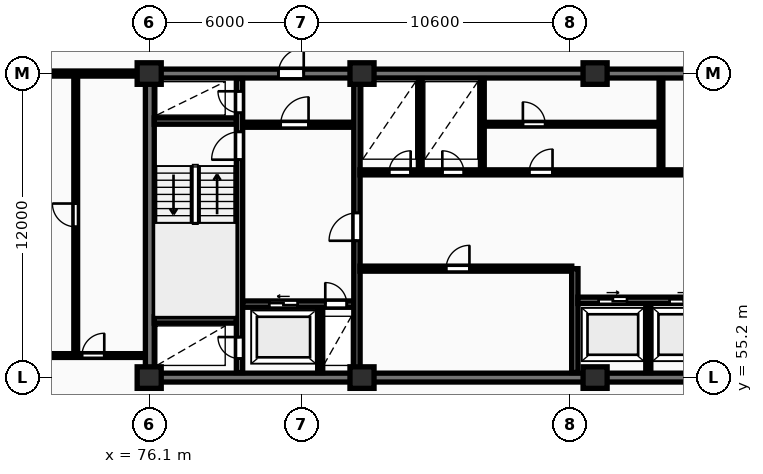
"""IFC4 building model, lengths in metres.
Left out: names, types, materials, properties, quantities, classifications, styles, units other than length and angle.
Written with IfcOpenShell. Run it as: python <this file> out.ifc"""

import sys

from ifc_helpers import new_model, si_unit, direction, frame, frame_2d, origin, origin_2d, place, context, subcontext, project, spatial, rectangle, extrude, element, fill, save


model = new_model("IFC4")
c1 = context("Model", 3, precision=1e-05, world=origin(), true_north=direction((0.0, 1.0)))
c2 = subcontext(c1, "Body", "Model", "MODEL_VIEW")
j1 = project(units=[si_unit("LENGTHUNIT", "METRE"), si_unit("PLANEANGLEUNIT", "RADIAN")], contexts=[c1])
p1 = place(None, origin())
s1 = spatial("IfcSite", under=j1, at=p1, CompositionType="ELEMENT")
p2 = place(p1, origin())
s2 = spatial("IfcBuilding", under=s1, at=p2, CompositionType="ELEMENT")
p3 = place(p2, frame((0.0, 0.0, 132.8)))
s3 = spatial("IfcBuildingStorey", under=s2, at=p3, CompositionType="ELEMENT", Elevation=132.8)
for number, where, z_axis, x_axis in (
    (1, (76.1, 55.2, 0.0), (0.0, 0.0, 1.0), (1.0, 0.0, 0.0)),
    (2, (76.1, 67.2, 0.0), (0.0, 0.0, 1.0), (1.0, 0.0, 0.0)),
    (3, (84.5, 55.2, 0.0), (0.0, 0.0, 1.0), (1.0, 0.0, 0.0)),
    (4, (84.5, 67.2, 0.0), (0.0, 0.0, 1.0), (1.0, 0.0, 0.0)),
    (5, (93.7, 55.2, 0.0), (0.0, 0.0, 1.0), (1.0, 0.0, 0.0)),
    (6, (93.7, 67.2, 0.0), (0.0, 0.0, 1.0), (1.0, 0.0, 0.0)),
):
    element("IfcColumn", number, at=place(p3, frame(where, z_axis=z_axis, x_axis=x_axis)), inside=s3, PredefinedType="COLUMN", context=c2, shape_type="SweptSolid", body=[
        extrude(rectangle(XDim=0.95, YDim=0.85, at=origin_2d()), origin(), (0.0, 0.0, 1.0), 3.25),
    ])
p4 = place(p3, frame((75.95, 55.2, 0.0), z_axis=(0.0, 0.0, 1.0), x_axis=(1.0, 0.0, 0.0)))
e7 = element("IfcWall", 7, at=p4, inside=s3, PredefinedType="SHEAR", context=c2, shape_type="SweptSolid", body=[
    extrude(rectangle(XDim=36.3, YDim=0.35, at=frame_2d((18.15, 0.0))), origin(), (0.0, 0.0, 1.0), 3.25),
])
p5 = place(p3, frame((76.125, 55.375, 0.0), z_axis=(0.0, 0.0, 1.0), x_axis=(0.0, 1.0, 0.0)))
e8 = element("IfcWall", 8, at=p5, inside=s3, PredefinedType="SHEAR", context=c2, shape_type="SweptSolid", body=[
    extrude(rectangle(XDim=11.65, YDim=0.35, at=frame_2d((5.825, 0.0))), origin(), (0.0, 0.0, 1.0), 3.25),
])
p6 = place(p3, frame((75.95, 67.2, 0.0), z_axis=(0.0, 0.0, 1.0), x_axis=(1.0, 0.0, 0.0)))
e9 = element("IfcWall", 9, at=p6, inside=s3, PredefinedType="SHEAR", context=c2, shape_type="SweptSolid", body=[
    extrude(rectangle(XDim=36.3, YDim=0.35, at=frame_2d((18.15, 0.0))), origin(), (0.0, 0.0, 1.0), 3.25),
])
p7 = place(p6, frame((5.25, 0.0, 0.0)))
e10 = element("IfcOpeningElement", 10, at=p7, cuts=e9, PredefinedType="OPENING", context=c2, shape_type="SweptSolid", body=[
    extrude(rectangle(XDim=1.0, YDim=2.15, at=frame_2d((0.5, 1.075))), frame((0.0, 0.185, 0.0), z_axis=(0.0, -1.0, 0.0), x_axis=(1.0, 0.0, 0.0)), (0.0, 0.0, 1.0), 0.37),
])
p8 = place(p6, frame((21.6, 0.0, 0.0)))
e11 = element("IfcOpeningElement", 11, at=p8, cuts=e9, PredefinedType="OPENING", context=c2, shape_type="SweptSolid", body=[
    extrude(rectangle(XDim=1.5, YDim=2.2, at=frame_2d((0.75, 1.1))), frame((0.0, 0.185, 0.0), z_axis=(0.0, -1.0, 0.0), x_axis=(1.0, 0.0, 0.0)), (0.0, 0.0, 1.0), 0.37),
])
p9 = place(p6, frame((30.45, 0.0, 0.0)))
e12 = element("IfcOpeningElement", 12, at=p9, cuts=e9, PredefinedType="OPENING", context=c2, shape_type="SweptSolid", body=[
    extrude(rectangle(XDim=1.0, YDim=2.15, at=frame_2d((0.5, 1.075))), frame((0.0, 0.185, 0.0), z_axis=(0.0, -1.0, 0.0), x_axis=(1.0, 0.0, 0.0)), (0.0, 0.0, 1.0), 0.37),
])
p10 = place(p3, frame((79.665, 55.4, 0.0), z_axis=(0.0, 0.0, 1.0), x_axis=(0.0, 1.0, 0.0)))
e13 = element("IfcWall", 13, at=p10, inside=s3, PredefinedType="SHEAR", context=c2, shape_type="SweptSolid", body=[
    extrude(rectangle(XDim=11.6, YDim=0.25, at=frame_2d((5.8, 0.0))), origin(), (0.0, 0.0, 1.0), 3.25),
])
p11 = place(p10, frame((0.55, 0.0, 0.0)))
e14 = element("IfcOpeningElement", 14, at=p11, cuts=e13, PredefinedType="OPENING", context=c2, shape_type="SweptSolid", body=[
    extrude(rectangle(XDim=0.85, YDim=2.05, at=frame_2d((0.425, 1.025))), frame((0.0, 0.135, 0.0), z_axis=(0.0, -1.0, 0.0), x_axis=(1.0, 0.0, 0.0)), (0.0, 0.0, 1.0), 0.27),
])
p12 = place(p10, frame((8.4, 0.0, 0.0)))
e15 = element("IfcOpeningElement", 15, at=p12, cuts=e13, PredefinedType="OPENING", context=c2, shape_type="SweptSolid", body=[
    extrude(rectangle(XDim=1.1, YDim=2.1, at=frame_2d((0.55, 1.05))), frame((0.0, 0.135, 0.0), z_axis=(0.0, -1.0, 0.0), x_axis=(1.0, 0.0, 0.0)), (0.0, 0.0, 1.0), 0.27),
])
p13 = place(p10, frame((10.25, 0.0, 0.0)))
e16 = element("IfcOpeningElement", 16, at=p13, cuts=e13, PredefinedType="OPENING", context=c2, shape_type="SweptSolid", body=[
    extrude(rectangle(XDim=0.85, YDim=2.05, at=frame_2d((0.425, 1.025))), frame((0.0, 0.135, 0.0), z_axis=(0.0, -1.0, 0.0), x_axis=(1.0, 0.0, 0.0)), (0.0, 0.0, 1.0), 0.27),
])
for number, where, z_axis, x_axis in (
    (17, (76.3, 57.475, 0.0), (0.0, 0.0, 1.0), (1.0, 0.0, 0.0)),
    (18, (76.3, 65.325, 0.0), (0.0, 0.0, 1.0), (1.0, 0.0, 0.0)),
):
    element("IfcWall", number, at=place(p3, frame(where, z_axis=z_axis, x_axis=x_axis)), inside=s3, PredefinedType="SHEAR", context=c2, shape_type="SweptSolid", body=[
        extrude(rectangle(XDim=3.24, YDim=0.25, at=frame_2d((1.62, 0.0))), origin(), (0.0, 0.0, 1.0), 3.25),
    ])
p14 = place(p3, frame((79.79, 58.1, 0.0), z_axis=(0.0, 0.0, 1.0), x_axis=(1.0, 0.0, 0.0)))
e19 = element("IfcWall", 19, at=p14, inside=s3, PredefinedType="SHEAR", context=c2, shape_type="SweptSolid", body=[
    extrude(rectangle(XDim=4.39, YDim=0.25, at=frame_2d((2.195, 0.0))), origin(), (0.0, 0.0, 1.0), 3.25),
])
p15 = place(p14, frame((1.05, 0.0, 0.0)))
e20 = element("IfcOpeningElement", 20, at=p15, cuts=e19, PredefinedType="OPENING", context=c2, shape_type="SweptSolid", body=[
    extrude(rectangle(XDim=1.12, YDim=2.12, at=frame_2d((0.56, 1.06))), frame((0.0, 0.135, 0.0), z_axis=(0.0, -1.0, 0.0), x_axis=(1.0, 0.0, 0.0)), (0.0, 0.0, 1.0), 0.27),
])
p16 = place(p14, frame((3.26, 0.0, 0.0)))
e21 = element("IfcOpeningElement", 21, at=p16, cuts=e19, PredefinedType="OPENING", context=c2, shape_type="SweptSolid", body=[
    extrude(rectangle(XDim=0.85, YDim=2.05, at=frame_2d((0.425, 1.025))), frame((0.0, 0.135, 0.0), z_axis=(0.0, -1.0, 0.0), x_axis=(1.0, 0.0, 0.0)), (0.0, 0.0, 1.0), 0.27),
])
p17 = place(p3, frame((82.85, 55.4, 0.0), z_axis=(0.0, 0.0, 1.0), x_axis=(0.0, 1.0, 0.0)))
e22 = element("IfcWall", 22, at=p17, inside=s3, PredefinedType="PARTITIONING", context=c2, shape_type="SweptSolid", body=[
    extrude(rectangle(XDim=2.56, YDim=0.2, at=frame_2d((1.28, 0.0))), origin(), (0.0, 0.0, 1.0), 2.97),
])
p18 = place(p3, frame((79.79, 65.18, 0.0), z_axis=(0.0, 0.0, 1.0), x_axis=(1.0, 0.0, 0.0)))
e23 = element("IfcWall", 23, at=p18, inside=s3, PredefinedType="PARTITIONING", context=c2, shape_type="SweptSolid", body=[
    extrude(rectangle(XDim=4.39, YDim=0.2, at=frame_2d((2.195, 0.0))), origin(), (0.0, 0.0, 1.0), 2.97),
])
p19 = place(p18, frame((1.5, 0.0, 0.0)))
e24 = element("IfcOpeningElement", 24, at=p19, cuts=e23, PredefinedType="OPENING", context=c2, shape_type="SweptSolid", body=[
    extrude(rectangle(XDim=1.1, YDim=2.1, at=frame_2d((0.55, 1.05))), frame((0.0, 0.11, 0.0), z_axis=(0.0, -1.0, 0.0), x_axis=(1.0, 0.0, 0.0)), (0.0, 0.0, 1.0), 0.22),
])
p20 = place(p3, frame((84.3, 55.4, 0.0), z_axis=(0.0, 0.0, 1.0), x_axis=(0.0, 1.0, 0.0)))
e25 = element("IfcWall", 25, at=p20, inside=s3, PredefinedType="SHEAR", context=c2, shape_type="SweptSolid", body=[
    extrude(rectangle(XDim=11.6, YDim=0.25, at=frame_2d((5.8, 0.0))), origin(), (0.0, 0.0, 1.0), 3.25),
])
p21 = place(p20, frame((5.2, 0.0, 0.0)))
e26 = element("IfcOpeningElement", 26, at=p21, cuts=e25, PredefinedType="OPENING", context=c2, shape_type="SweptSolid", body=[
    extrude(rectangle(XDim=1.1, YDim=2.1, at=frame_2d((0.55, 1.05))), frame((0.0, 0.135, 0.0), z_axis=(0.0, -1.0, 0.0), x_axis=(1.0, 0.0, 0.0)), (0.0, 0.0, 1.0), 0.27),
])
p22 = place(p3, frame((84.42, 59.5, 0.0), z_axis=(0.0, 0.0, 1.0), x_axis=(1.0, 0.0, 0.0)))
e27 = element("IfcWall", 27, at=p22, inside=s3, PredefinedType="PARTITIONING", context=c2, shape_type="SweptSolid", body=[
    extrude(rectangle(XDim=8.36, YDim=0.2, at=frame_2d((4.18, 0.0))), origin(), (0.0, 0.0, 1.0), 2.97),
])
p23 = place(p22, frame((3.4, 0.0, 0.0)))
e28 = element("IfcOpeningElement", 28, at=p23, cuts=e27, PredefinedType="OPENING", context=c2, shape_type="SweptSolid", body=[
    extrude(rectangle(XDim=0.92, YDim=2.08, at=frame_2d((0.46, 1.04))), frame((0.0, 0.11, 0.0), z_axis=(0.0, -1.0, 0.0), x_axis=(1.0, 0.0, 0.0)), (0.0, 0.0, 1.0), 0.22),
])
p24 = place(p3, frame((92.9, 55.4, 0.0), z_axis=(0.0, 0.0, 1.0), x_axis=(0.0, 1.0, 0.0)))
e29 = element("IfcWall", 29, at=p24, inside=s3, PredefinedType="SHEAR", context=c2, shape_type="SweptSolid", body=[
    extrude(rectangle(XDim=4.1, YDim=0.25, at=frame_2d((2.05, 0.0))), origin(), (0.0, 0.0, 1.0), 3.25),
])
p25 = place(p3, frame((95.8, 55.4, 0.0), z_axis=(0.0, 0.0, 1.0), x_axis=(0.0, 1.0, 0.0)))
e30 = element("IfcWall", 30, at=p25, inside=s3, PredefinedType="PARTITIONING", context=c2, shape_type="SweptSolid", body=[
    extrude(rectangle(XDim=2.72, YDim=0.2, at=frame_2d((1.36, 0.0))), origin(), (0.0, 0.0, 1.0), 2.97),
])
p26 = place(p3, frame((93.02, 58.25, 0.0), z_axis=(0.0, 0.0, 1.0), x_axis=(1.0, 0.0, 0.0)))
e31 = element("IfcWall", 31, at=p26, inside=s3, PredefinedType="SHEAR", context=c2, shape_type="SweptSolid", body=[
    extrude(rectangle(XDim=8.36, YDim=0.25, at=frame_2d((4.18, 0.0))), origin(), (0.0, 0.0, 1.0), 3.25),
])
p27 = place(p26, frame((0.82, 0.0, 0.0)))
e32 = element("IfcOpeningElement", 32, at=p27, cuts=e31, PredefinedType="OPENING", context=c2, shape_type="SweptSolid", body=[
    extrude(rectangle(XDim=1.12, YDim=2.12, at=frame_2d((0.56, 1.06))), frame((0.0, 0.135, 0.0), z_axis=(0.0, -1.0, 0.0), x_axis=(1.0, 0.0, 0.0)), (0.0, 0.0, 1.0), 0.27),
])
p28 = place(p26, frame((3.62, 0.0, 0.0)))
e33 = element("IfcOpeningElement", 33, at=p28, cuts=e31, PredefinedType="OPENING", context=c2, shape_type="SweptSolid", body=[
    extrude(rectangle(XDim=1.12, YDim=2.12, at=frame_2d((0.56, 1.06))), frame((0.0, 0.135, 0.0), z_axis=(0.0, -1.0, 0.0), x_axis=(1.0, 0.0, 0.0)), (0.0, 0.0, 1.0), 0.27),
])
p29 = place(p26, frame((6.42, 0.0, 0.0)))
e34 = element("IfcOpeningElement", 34, at=p29, cuts=e31, PredefinedType="OPENING", context=c2, shape_type="SweptSolid", body=[
    extrude(rectangle(XDim=1.12, YDim=2.12, at=frame_2d((0.56, 1.06))), frame((0.0, 0.135, 0.0), z_axis=(0.0, -1.0, 0.0), x_axis=(1.0, 0.0, 0.0)), (0.0, 0.0, 1.0), 0.27),
])
for number, where, z_axis, x_axis in (
    (35, (86.8, 63.4, 0.0), (0.0, 0.0, 1.0), (0.0, 1.0, 0.0)),
    (36, (89.25, 63.4, 0.0), (0.0, 0.0, 1.0), (0.0, 1.0, 0.0)),
):
    element("IfcWall", number, at=place(p3, frame(where, z_axis=z_axis, x_axis=x_axis)), inside=s3, PredefinedType="PARTITIONING", context=c2, shape_type="SweptSolid", body=[
        extrude(rectangle(XDim=3.6, YDim=0.15, at=frame_2d((1.8, 0.0))), origin(), (0.0, 0.0, 1.0), 2.97),
    ])
p30 = place(p3, frame((89.25, 65.2, 0.0), z_axis=(0.0, 0.0, 1.0), x_axis=(1.0, 0.0, 0.0)))
e37 = element("IfcWall", 37, at=p30, inside=s3, PredefinedType="PARTITIONING", context=c2, shape_type="SweptSolid", body=[
    extrude(rectangle(XDim=7.05, YDim=0.15, at=frame_2d((3.525, 0.0))), origin(), (0.0, 0.0, 1.0), 2.97),
])
p31 = place(p30, frame((1.6, 0.0, 0.0)))
e38 = element("IfcOpeningElement", 38, at=p31, cuts=e37, PredefinedType="OPENING", context=c2, shape_type="SweptSolid", body=[
    extrude(rectangle(XDim=0.88, YDim=2.06, at=frame_2d((0.44, 1.03))), frame((0.0, 0.085, 0.0), z_axis=(0.0, -1.0, 0.0), x_axis=(1.0, 0.0, 0.0)), (0.0, 0.0, 1.0), 0.17),
])
p32 = place(p3, frame((96.3, 63.4, 0.0), z_axis=(0.0, 0.0, 1.0), x_axis=(0.0, 1.0, 0.0)))
e39 = element("IfcWall", 39, at=p32, inside=s3, PredefinedType="PARTITIONING", context=c2, shape_type="SweptSolid", body=[
    extrude(rectangle(XDim=3.6, YDim=0.15, at=frame_2d((1.8, 0.0))), origin(), (0.0, 0.0, 1.0), 2.97),
])
p33 = place(p3, frame((84.42, 63.3, 0.0), z_axis=(0.0, 0.0, 1.0), x_axis=(1.0, 0.0, 0.0)))
e40 = element("IfcWall", 40, at=p33, inside=s3, PredefinedType="PARTITIONING", context=c2, shape_type="SweptSolid", body=[
    extrude(rectangle(XDim=19.83, YDim=0.2, at=frame_2d((9.915, 0.0))), origin(), (0.0, 0.0, 1.0), 2.97),
])
p34 = place(p33, frame((1.15, 0.0, 0.0)))
e41 = element("IfcOpeningElement", 41, at=p34, cuts=e40, PredefinedType="OPENING", context=c2, shape_type="SweptSolid", body=[
    extrude(rectangle(XDim=0.85, YDim=2.05, at=frame_2d((0.425, 1.025))), frame((0.0, 0.11, 0.0), z_axis=(0.0, -1.0, 0.0), x_axis=(1.0, 0.0, 0.0)), (0.0, 0.0, 1.0), 0.22),
])
p35 = place(p33, frame((3.25, 0.0, 0.0)))
e42 = element("IfcOpeningElement", 42, at=p35, cuts=e40, PredefinedType="OPENING", context=c2, shape_type="SweptSolid", body=[
    extrude(rectangle(XDim=0.85, YDim=2.05, at=frame_2d((0.425, 1.025))), frame((0.0, 0.11, 0.0), z_axis=(0.0, -1.0, 0.0), x_axis=(1.0, 0.0, 0.0)), (0.0, 0.0, 1.0), 0.22),
])
p36 = place(p33, frame((13.08, 0.0, 0.0)))
e43 = element("IfcOpeningElement", 43, at=p36, cuts=e40, PredefinedType="OPENING", context=c2, shape_type="SweptSolid", body=[
    extrude(rectangle(XDim=1.5, YDim=2.2, at=frame_2d((0.75, 1.1))), frame((0.0, 0.11, 0.0), z_axis=(0.0, -1.0, 0.0), x_axis=(1.0, 0.0, 0.0)), (0.0, 0.0, 1.0), 0.22),
])
p37 = place(p33, frame((6.68, 0.0, 0.0)))
e44 = element("IfcOpeningElement", 44, at=p37, cuts=e40, PredefinedType="OPENING", context=c2, shape_type="SweptSolid", body=[
    extrude(rectangle(XDim=0.92, YDim=2.08, at=frame_2d((0.46, 1.04))), frame((0.0, 0.11, 0.0), z_axis=(0.0, -1.0, 0.0), x_axis=(1.0, 0.0, 0.0)), (0.0, 0.0, 1.0), 0.22),
])
p38 = place(p33, frame((16.33, 0.0, 0.0)))
e45 = element("IfcOpeningElement", 45, at=p38, cuts=e40, PredefinedType="OPENING", context=c2, shape_type="SweptSolid", body=[
    extrude(rectangle(XDim=0.88, YDim=2.06, at=frame_2d((0.44, 1.03))), frame((0.0, 0.11, 0.0), z_axis=(0.0, -1.0, 0.0), x_axis=(1.0, 0.0, 0.0)), (0.0, 0.0, 1.0), 0.22),
])
p39 = place(p3, frame((73.2, 56.07, 0.0), z_axis=(0.0, 0.0, 1.0), x_axis=(0.0, 1.0, 0.0)))
e46 = element("IfcWall", 46, at=p39, inside=s3, PredefinedType="PARTITIONING", context=c2, shape_type="SweptSolid", body=[
    extrude(rectangle(XDim=11.08, YDim=0.15, at=frame_2d((5.54, 0.0))), origin(), (0.0, 0.0, 1.0), 2.97),
])
p40 = place(p39, frame((5.08, 0.0, 0.0)))
e47 = element("IfcOpeningElement", 47, at=p40, cuts=e46, PredefinedType="OPENING", context=c2, shape_type="SweptSolid", body=[
    extrude(rectangle(XDim=0.92, YDim=2.08, at=frame_2d((0.46, 1.04))), frame((0.0, 0.085, 0.0), z_axis=(0.0, -1.0, 0.0), x_axis=(1.0, 0.0, 0.0)), (0.0, 0.0, 1.0), 0.17),
])
p41 = place(p3, frame((69.17, 56.07, 0.0), z_axis=(0.0, 0.0, 1.0), x_axis=(1.0, 0.0, 0.0)))
e48 = element("IfcWall", 48, at=p41, inside=s3, PredefinedType="PARTITIONING", context=c2, shape_type="SweptSolid", body=[
    extrude(rectangle(XDim=6.76, YDim=0.15, at=frame_2d((3.38, 0.0))), origin(), (0.0, 0.0, 1.0), 2.97),
])
p42 = place(p41, frame((1.362, 0.0, 0.0)))
e49 = element("IfcOpeningElement", 49, at=p42, cuts=e48, PredefinedType="OPENING", context=c2, shape_type="SweptSolid", body=[
    extrude(rectangle(XDim=0.84, YDim=2.04, at=frame_2d((0.42, 1.02))), frame((0.0, 0.085, 0.0), z_axis=(0.0, -1.0, 0.0), x_axis=(1.0, 0.0, 0.0)), (0.0, 0.0, 1.0), 0.17),
])
p43 = place(p41, frame((4.277, 0.0, 0.0)))
e50 = element("IfcOpeningElement", 50, at=p43, cuts=e48, PredefinedType="OPENING", context=c2, shape_type="SweptSolid", body=[
    extrude(rectangle(XDim=0.88, YDim=2.06, at=frame_2d((0.44, 1.03))), frame((0.0, 0.085, 0.0), z_axis=(0.0, -1.0, 0.0), x_axis=(1.0, 0.0, 0.0)), (0.0, 0.0, 1.0), 0.17),
])
p44 = place(p3, frame((57.6, 67.2, 0.0), z_axis=(0.0, 0.0, 1.0), x_axis=(1.0, 0.0, 0.0)))
e51 = element("IfcWall", 51, at=p44, inside=s3, PredefinedType="PARTITIONING", context=c2, shape_type="SweptSolid", body=[
    extrude(rectangle(XDim=18.35, YDim=0.2, at=frame_2d((9.175, 0.0))), origin(), (0.0, 0.0, 1.0), 2.433),
])
p45 = place(p44, frame((12.075, 0.0, 0.0)))
e52 = element("IfcOpeningElement", 52, at=p45, cuts=e51, PredefinedType="OPENING", context=c2, shape_type="SweptSolid", body=[
    extrude(rectangle(XDim=0.95, YDim=2.15, at=frame_2d((0.475, 1.075))), frame((0.0, 0.11, 0.0), z_axis=(0.0, -1.0, 0.0), x_axis=(1.0, 0.0, 0.0)), (0.0, 0.0, 1.0), 0.22),
])
p46 = place(p7, origin())
e53 = element("IfcDoor", 53, at=p46, inside=s3, OperationType="SINGLE_SWING_RIGHT", PredefinedType="DOOR", context=c2, shape_type="SweptSolid", body=[
    extrude(rectangle(XDim=1.0, YDim=2.15, at=frame_2d((0.5, 1.075))), frame((0.0, 0.025, 0.0), z_axis=(0.0, -1.0, 0.0), x_axis=(1.0, 0.0, 0.0)), (0.0, 0.0, 1.0), 0.05),
])
fill(e10, e53)
p47 = place(p11, origin())
e54 = element("IfcDoor", 54, at=p47, inside=s3, OperationType="SINGLE_SWING_RIGHT", PredefinedType="DOOR", context=c2, shape_type="SweptSolid", body=[
    extrude(rectangle(XDim=0.85, YDim=2.05, at=frame_2d((0.425, 1.025))), frame((0.0, 0.025, 0.0), z_axis=(0.0, -1.0, 0.0), x_axis=(1.0, 0.0, 0.0)), (0.0, 0.0, 1.0), 0.05),
])
fill(e14, e54)
p48 = place(p12, origin())
e55 = element("IfcDoor", 55, at=p48, inside=s3, OperationType="SINGLE_SWING_LEFT", PredefinedType="DOOR", context=c2, shape_type="SweptSolid", body=[
    extrude(rectangle(XDim=1.1, YDim=2.1, at=frame_2d((0.55, 1.05))), frame((0.0, 0.025, 0.0), z_axis=(0.0, -1.0, 0.0), x_axis=(1.0, 0.0, 0.0)), (0.0, 0.0, 1.0), 0.05),
])
fill(e15, e55)
p49 = place(p13, origin())
e56 = element("IfcDoor", 56, at=p49, inside=s3, OperationType="SINGLE_SWING_RIGHT", PredefinedType="DOOR", context=c2, shape_type="SweptSolid", body=[
    extrude(rectangle(XDim=0.85, YDim=2.05, at=frame_2d((0.425, 1.025))), frame((0.0, 0.025, 0.0), z_axis=(0.0, -1.0, 0.0), x_axis=(1.0, 0.0, 0.0)), (0.0, 0.0, 1.0), 0.05),
])
fill(e16, e56)
p50 = place(p15, origin())
e57 = element("IfcDoor", 57, at=p50, inside=s3, OperationType="SLIDING_TO_LEFT", PredefinedType="DOOR", context=c2, shape_type="SweptSolid", body=[
    extrude(rectangle(XDim=1.12, YDim=2.12, at=frame_2d((0.56, 1.06))), frame((0.0, 0.025, 0.0), z_axis=(0.0, -1.0, 0.0), x_axis=(1.0, 0.0, 0.0)), (0.0, 0.0, 1.0), 0.05),
])
fill(e20, e57)
p51 = place(p16, origin())
e58 = element("IfcDoor", 58, at=p51, inside=s3, OperationType="SINGLE_SWING_LEFT", PredefinedType="DOOR", context=c2, shape_type="SweptSolid", body=[
    extrude(rectangle(XDim=0.85, YDim=2.05, at=frame_2d((0.425, 1.025))), frame((0.0, 0.025, 0.0), z_axis=(0.0, -1.0, 0.0), x_axis=(1.0, 0.0, 0.0)), (0.0, 0.0, 1.0), 0.05),
])
fill(e21, e58)
p52 = place(p19, origin())
e59 = element("IfcDoor", 59, at=p52, inside=s3, OperationType="SINGLE_SWING_RIGHT", PredefinedType="DOOR", context=c2, shape_type="SweptSolid", body=[
    extrude(rectangle(XDim=1.1, YDim=2.1, at=frame_2d((0.55, 1.05))), frame((0.0, 0.025, 0.0), z_axis=(0.0, -1.0, 0.0), x_axis=(1.0, 0.0, 0.0)), (0.0, 0.0, 1.0), 0.05),
])
fill(e24, e59)
p53 = place(p21, origin())
e60 = element("IfcDoor", 60, at=p53, inside=s3, OperationType="SINGLE_SWING_LEFT", PredefinedType="DOOR", context=c2, shape_type="SweptSolid", body=[
    extrude(rectangle(XDim=1.1, YDim=2.1, at=frame_2d((0.55, 1.05))), frame((0.0, 0.025, 0.0), z_axis=(0.0, -1.0, 0.0), x_axis=(1.0, 0.0, 0.0)), (0.0, 0.0, 1.0), 0.05),
])
fill(e26, e60)
p54 = place(p23, origin())
e61 = element("IfcDoor", 61, at=p54, inside=s3, OperationType="SINGLE_SWING_RIGHT", PredefinedType="DOOR", context=c2, shape_type="SweptSolid", body=[
    extrude(rectangle(XDim=0.92, YDim=2.08, at=frame_2d((0.46, 1.04))), frame((0.0, 0.025, 0.0), z_axis=(0.0, -1.0, 0.0), x_axis=(1.0, 0.0, 0.0)), (0.0, 0.0, 1.0), 0.05),
])
fill(e28, e61)
p55 = place(p27, origin())
e62 = element("IfcDoor", 62, at=p55, inside=s3, OperationType="SLIDING_TO_RIGHT", PredefinedType="DOOR", context=c2, shape_type="SweptSolid", body=[
    extrude(rectangle(XDim=1.12, YDim=2.12, at=frame_2d((0.56, 1.06))), frame((0.0, 0.025, 0.0), z_axis=(0.0, -1.0, 0.0), x_axis=(1.0, 0.0, 0.0)), (0.0, 0.0, 1.0), 0.05),
])
fill(e32, e62)
p56 = place(p28, origin())
e63 = element("IfcDoor", 63, at=p56, inside=s3, OperationType="SLIDING_TO_RIGHT", PredefinedType="DOOR", context=c2, shape_type="SweptSolid", body=[
    extrude(rectangle(XDim=1.12, YDim=2.12, at=frame_2d((0.56, 1.06))), frame((0.0, 0.025, 0.0), z_axis=(0.0, -1.0, 0.0), x_axis=(1.0, 0.0, 0.0)), (0.0, 0.0, 1.0), 0.05),
])
fill(e33, e63)
p57 = place(p31, origin())
e64 = element("IfcDoor", 64, at=p57, inside=s3, OperationType="SINGLE_SWING_LEFT", PredefinedType="DOOR", context=c2, shape_type="SweptSolid", body=[
    extrude(rectangle(XDim=0.88, YDim=2.06, at=frame_2d((0.44, 1.03))), frame((0.0, 0.025, 0.0), z_axis=(0.0, -1.0, 0.0), x_axis=(1.0, 0.0, 0.0)), (0.0, 0.0, 1.0), 0.05),
])
fill(e38, e64)
p58 = place(p34, origin())
e65 = element("IfcDoor", 65, at=p58, inside=s3, OperationType="SINGLE_SWING_RIGHT", PredefinedType="DOOR", context=c2, shape_type="SweptSolid", body=[
    extrude(rectangle(XDim=0.85, YDim=2.05, at=frame_2d((0.425, 1.025))), frame((0.0, 0.025, 0.0), z_axis=(0.0, -1.0, 0.0), x_axis=(1.0, 0.0, 0.0)), (0.0, 0.0, 1.0), 0.05),
])
fill(e41, e65)
p59 = place(p35, origin())
e66 = element("IfcDoor", 66, at=p59, inside=s3, OperationType="SINGLE_SWING_LEFT", PredefinedType="DOOR", context=c2, shape_type="SweptSolid", body=[
    extrude(rectangle(XDim=0.85, YDim=2.05, at=frame_2d((0.425, 1.025))), frame((0.0, 0.025, 0.0), z_axis=(0.0, -1.0, 0.0), x_axis=(1.0, 0.0, 0.0)), (0.0, 0.0, 1.0), 0.05),
])
fill(e42, e66)
p60 = place(p37, origin())
e67 = element("IfcDoor", 67, at=p60, inside=s3, OperationType="SINGLE_SWING_RIGHT", PredefinedType="DOOR", context=c2, shape_type="SweptSolid", body=[
    extrude(rectangle(XDim=0.92, YDim=2.08, at=frame_2d((0.46, 1.04))), frame((0.0, 0.025, 0.0), z_axis=(0.0, -1.0, 0.0), x_axis=(1.0, 0.0, 0.0)), (0.0, 0.0, 1.0), 0.05),
])
fill(e44, e67)
p61 = place(p40, origin())
e68 = element("IfcDoor", 68, at=p61, inside=s3, OperationType="SINGLE_SWING_RIGHT", PredefinedType="DOOR", context=c2, shape_type="SweptSolid", body=[
    extrude(rectangle(XDim=0.92, YDim=2.08, at=frame_2d((0.46, 1.04))), frame((0.0, 0.025, 0.0), z_axis=(0.0, -1.0, 0.0), x_axis=(1.0, 0.0, 0.0)), (0.0, 0.0, 1.0), 0.05),
])
fill(e47, e68)
p62 = place(p43, origin())
e69 = element("IfcDoor", 69, at=p62, inside=s3, OperationType="SINGLE_SWING_RIGHT", PredefinedType="DOOR", context=c2, shape_type="SweptSolid", body=[
    extrude(rectangle(XDim=0.88, YDim=2.06, at=frame_2d((0.44, 1.03))), frame((0.0, 0.025, 0.0), z_axis=(0.0, -1.0, 0.0), x_axis=(1.0, 0.0, 0.0)), (0.0, 0.0, 1.0), 0.05),
])
fill(e50, e69)
save(model, sys.argv[1])
